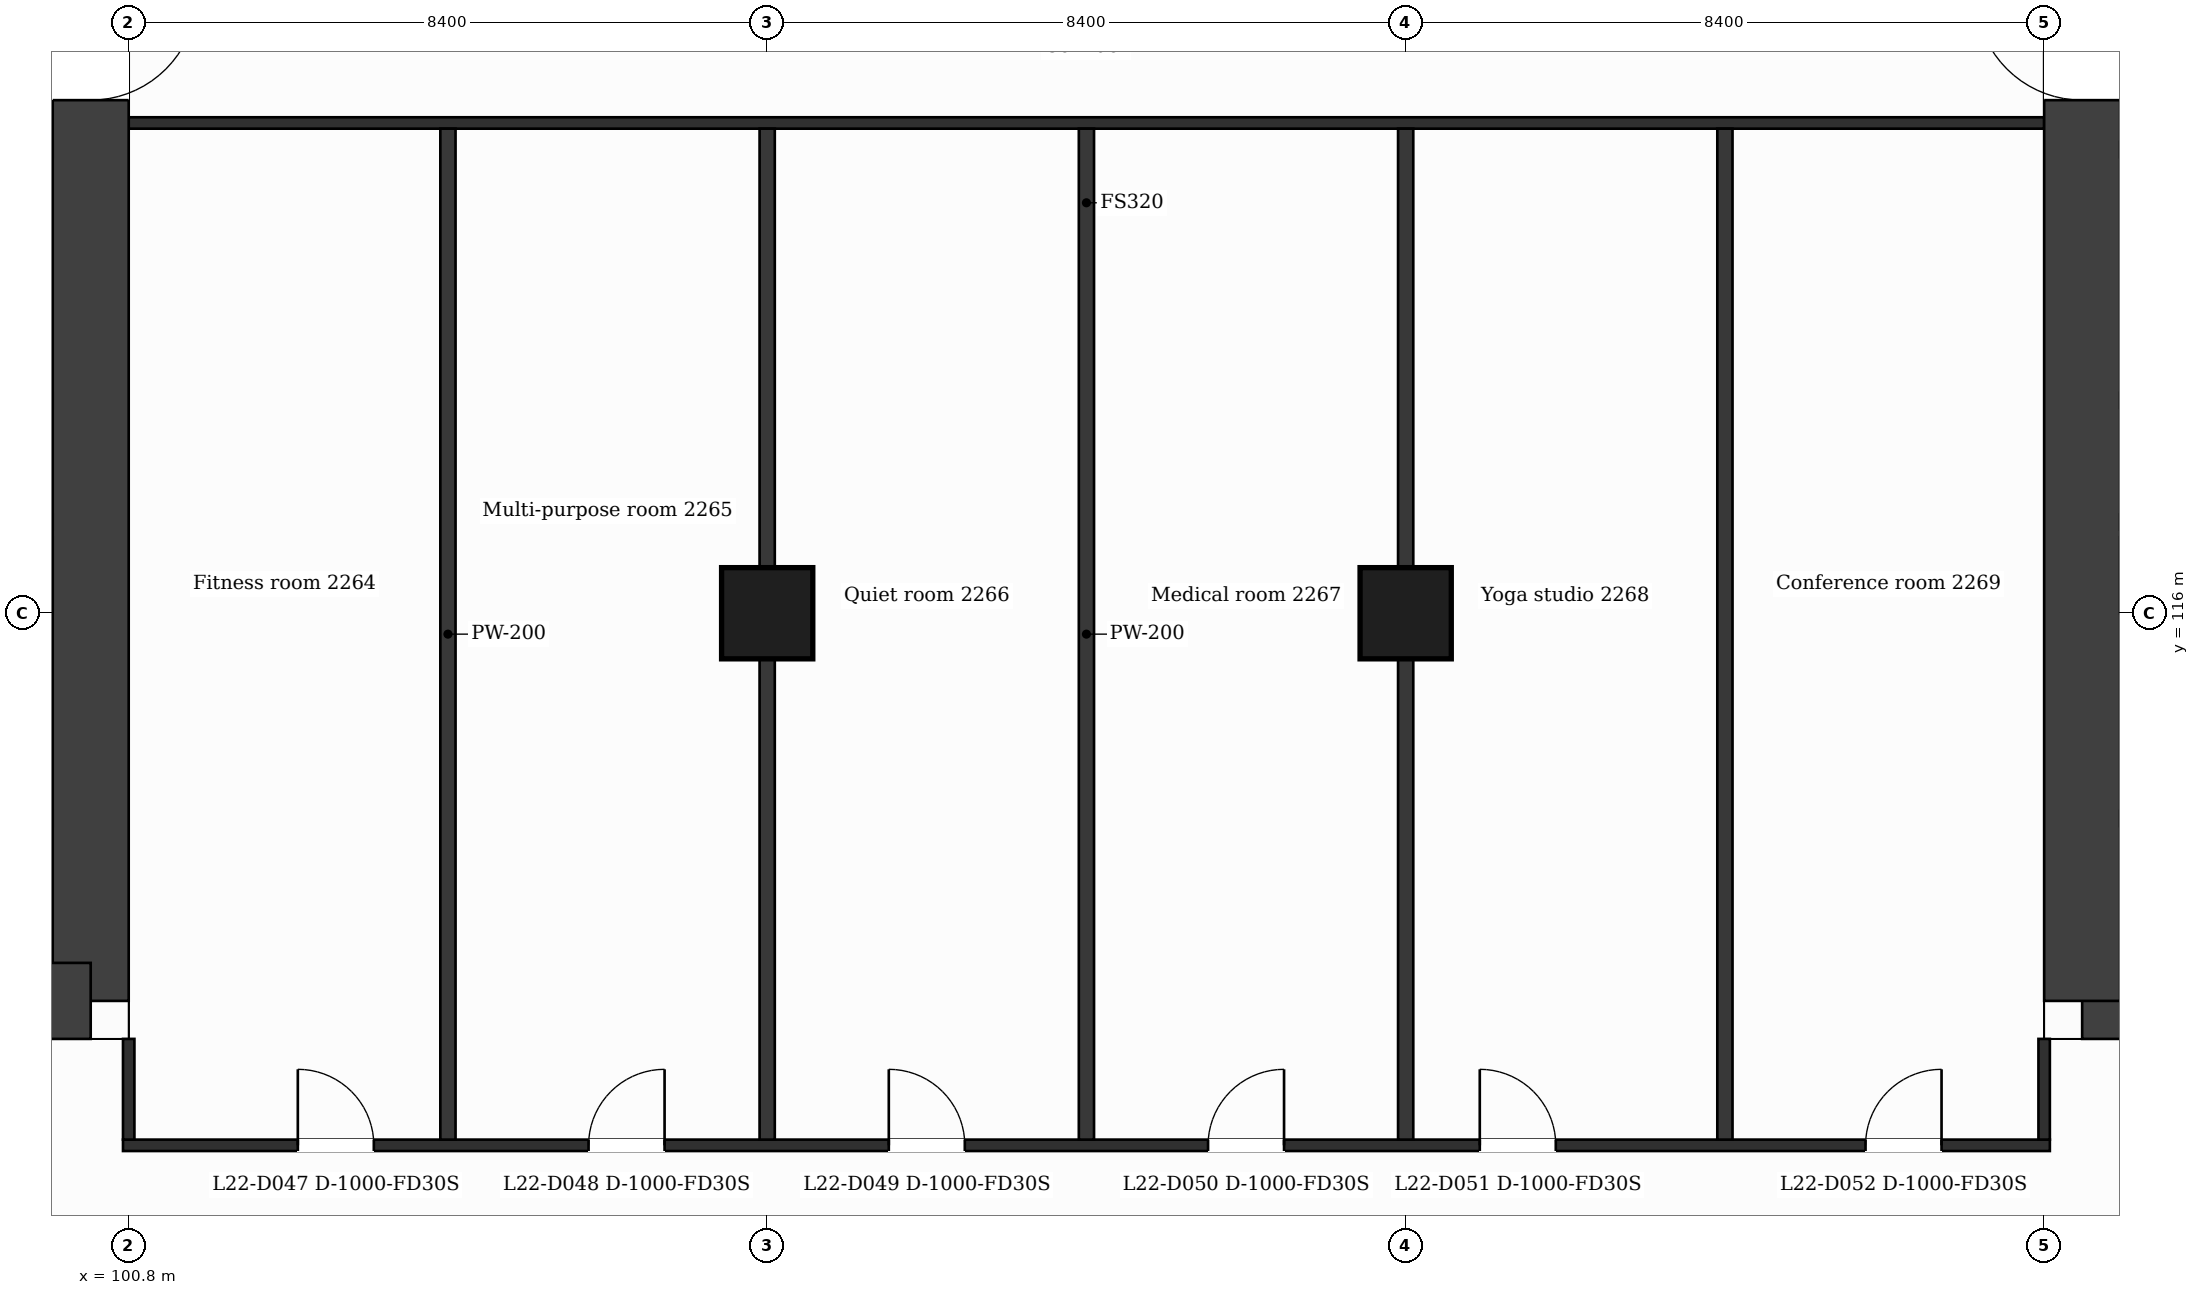
"""IFC4 building model, lengths in metres.
Left out: names, types, materials, properties, quantities, classifications, styles, units other than length and angle.
Written with IfcOpenShell. Run it as: python <this file> out.ifc"""

import sys

from ifc_helpers import new_model, si_unit, direction, frame, frame_2d, origin, origin_2d, place, context, subcontext, project, spatial, rectangle, extrude, element, fill, save


model = new_model("IFC4")
c1 = context("Model", 3, precision=1e-05, world=origin(), true_north=direction((0.0, 1.0)))
c2 = subcontext(c1, "Body", "Model", "MODEL_VIEW")
j1 = project(units=[si_unit("LENGTHUNIT", "METRE"), si_unit("PLANEANGLEUNIT", "RADIAN")], contexts=[c1])
p1 = place(None, origin())
s1 = spatial("IfcSite", under=j1, at=p1, CompositionType="ELEMENT")
p2 = place(p1, origin())
s2 = spatial("IfcBuilding", under=s1, at=p2, CompositionType="ELEMENT")
p3 = place(p2, frame((0.0, 0.0, 98.4)))
s3 = spatial("IfcBuildingStorey", under=s2, at=p3, CompositionType="ELEMENT", Elevation=98.4)
p4 = place(p3, frame((100.3, 131.9, 0.0), z_axis=(0.0, 0.0, 1.0), x_axis=(0.0, -1.0, 0.0)))
e1 = element("IfcWall", 1, at=p4, inside=s3, PredefinedType="SHEAR", context=c2, shape_type="SweptSolid", body=[
    extrude(rectangle(XDim=21.0, YDim=1.0, at=frame_2d((10.5, 0.0))), origin(), (0.0, 0.0, 1.0), 3.7),
])
p5 = place(p4, frame((7.75, 0.0, 0.0)))
e2 = element("IfcOpeningElement", 2, at=p5, cuts=e1, PredefinedType="OPENING", context=c2, shape_type="SweptSolid", body=[
    extrude(rectangle(XDim=1.4, YDim=2.1, at=frame_2d((0.7, 1.05))), frame((0.0, 0.51, 0.0), z_axis=(0.0, -1.0, 0.0), x_axis=(1.0, 0.0, 0.0)), (0.0, 0.0, 1.0), 1.02),
])
p6 = place(p3, frame((100.3, 110.9, 0.0), z_axis=(0.0, 0.0, 1.0), x_axis=(-1.0, 0.0, 0.0)))
e3 = element("IfcWall", 3, at=p6, inside=s3, PredefinedType="SHEAR", context=c2, shape_type="SweptSolid", body=[
    extrude(rectangle(XDim=14.059, YDim=1.0, at=frame_2d((7.03, 0.0))), origin(), (0.0, 0.0, 1.0), 3.7),
])
p7 = place(p6, frame((5.802, 0.0, 0.0)))
e4 = element("IfcOpeningElement", 4, at=p7, cuts=e3, PredefinedType="OPENING", context=c2, shape_type="SweptSolid", body=[
    extrude(rectangle(XDim=1.4, YDim=2.1, at=frame_2d((0.7, 1.05))), frame((0.0, 0.51, 0.0), z_axis=(0.0, -1.0, 0.0), x_axis=(1.0, 0.0, 0.0)), (0.0, 0.0, 1.0), 1.02),
])
p8 = place(p3, frame((94.9, 116.5, 0.0), z_axis=(0.0, 0.0, 1.0), x_axis=(1.0, 0.0, 0.0)))
e5 = element("IfcWall", 5, at=p8, inside=s3, PredefinedType="SHEAR", context=c2, shape_type="SweptSolid", body=[
    extrude(rectangle(XDim=4.9, YDim=1.0, at=frame_2d((2.45, 0.0))), origin(), (0.0, 0.0, 1.0), 3.7),
])
p9 = place(p3, frame((140.559, 110.9, 0.0), z_axis=(0.0, 0.0, 1.0), x_axis=(-1.0, 0.0, 0.0)))
e6 = element("IfcWall", 6, at=p9, inside=s3, PredefinedType="SHEAR", context=c2, shape_type="SweptSolid", body=[
    extrude(rectangle(XDim=14.059, YDim=1.0, at=frame_2d((7.029, 0.0))), origin(), (0.0, 0.0, 1.0), 3.7),
])
p10 = place(p9, frame((6.858, 0.0, 0.0)))
e7 = element("IfcOpeningElement", 7, at=p10, cuts=e6, PredefinedType="OPENING", context=c2, shape_type="SweptSolid", body=[
    extrude(rectangle(XDim=1.4, YDim=2.1, at=frame_2d((0.7, 1.05))), frame((0.0, 0.51, 0.0), z_axis=(0.0, -1.0, 0.0), x_axis=(1.0, 0.0, 0.0)), (0.0, 0.0, 1.0), 1.02),
])
p11 = place(p3, frame((126.5, 110.9, 0.0), z_axis=(0.0, 0.0, 1.0), x_axis=(0.0, 1.0, 0.0)))
e8 = element("IfcWall", 8, at=p11, inside=s3, PredefinedType="SHEAR", context=c2, shape_type="SweptSolid", body=[
    extrude(rectangle(XDim=21.0, YDim=1.0, at=frame_2d((10.5, 0.0))), origin(), (0.0, 0.0, 1.0), 3.7),
])
p12 = place(p11, frame((11.85, 0.0, 0.0)))
e9 = element("IfcOpeningElement", 9, at=p12, cuts=e8, PredefinedType="OPENING", context=c2, shape_type="SweptSolid", body=[
    extrude(rectangle(XDim=1.4, YDim=2.1, at=frame_2d((0.7, 1.05))), frame((0.0, 0.51, 0.0), z_axis=(0.0, -1.0, 0.0), x_axis=(1.0, 0.0, 0.0)), (0.0, 0.0, 1.0), 1.02),
])
for number, where, z_axis, x_axis in (
    (10, (109.2, 116.0, 0.0), (0.0, 0.0, 1.0), (1.0, 0.0, 0.0)),
    (11, (117.6, 116.0, 0.0), (0.0, 0.0, 1.0), (1.0, 0.0, 0.0)),
):
    element("IfcColumn", number, at=place(p3, frame(where, z_axis=z_axis, x_axis=x_axis)), inside=s3, PredefinedType="COLUMN", context=c2, shape_type="SweptSolid", body=[
        extrude(rectangle(XDim=1.2, YDim=1.2, at=origin_2d()), origin(), (0.0, 0.0, 1.0), 3.7),
    ])
p13 = place(p3, frame((100.725, 109.0, 0.0), z_axis=(0.0, 0.0, 1.0), x_axis=(1.0, 0.0, 0.0)))
e12 = element("IfcWall", 12, at=p13, inside=s3, PredefinedType="PARTITIONING", context=c2, shape_type="SweptSolid", body=[
    extrude(rectangle(XDim=25.35, YDim=0.15, at=frame_2d((12.675, 0.0))), origin(), (0.0, 0.0, 1.0), 3.38),
])
p14 = place(p13, frame((2.3, 0.0, 0.0)))
e13 = element("IfcOpeningElement", 13, at=p14, cuts=e12, PredefinedType="OPENING", context=c2, shape_type="SweptSolid", body=[
    extrude(rectangle(XDim=1.0, YDim=2.1, at=frame_2d((0.5, 1.05))), frame((0.0, 0.085, 0.0), z_axis=(0.0, -1.0, 0.0), x_axis=(1.0, 0.0, 0.0)), (0.0, 0.0, 1.0), 0.17),
])
p15 = place(p13, frame((6.125, 0.0, 0.0)))
e14 = element("IfcOpeningElement", 14, at=p15, cuts=e12, PredefinedType="OPENING", context=c2, shape_type="SweptSolid", body=[
    extrude(rectangle(XDim=1.0, YDim=2.1, at=frame_2d((0.5, 1.05))), frame((0.0, 0.085, 0.0), z_axis=(0.0, -1.0, 0.0), x_axis=(1.0, 0.0, 0.0)), (0.0, 0.0, 1.0), 0.17),
])
p16 = place(p13, frame((10.075, 0.0, 0.0)))
e15 = element("IfcOpeningElement", 15, at=p16, cuts=e12, PredefinedType="OPENING", context=c2, shape_type="SweptSolid", body=[
    extrude(rectangle(XDim=1.0, YDim=2.1, at=frame_2d((0.5, 1.05))), frame((0.0, 0.085, 0.0), z_axis=(0.0, -1.0, 0.0), x_axis=(1.0, 0.0, 0.0)), (0.0, 0.0, 1.0), 0.17),
])
p17 = place(p13, frame((14.275, 0.0, 0.0)))
e16 = element("IfcOpeningElement", 16, at=p17, cuts=e12, PredefinedType="OPENING", context=c2, shape_type="SweptSolid", body=[
    extrude(rectangle(XDim=1.0, YDim=2.1, at=frame_2d((0.5, 1.05))), frame((0.0, 0.085, 0.0), z_axis=(0.0, -1.0, 0.0), x_axis=(1.0, 0.0, 0.0)), (0.0, 0.0, 1.0), 0.17),
])
p18 = place(p13, frame((17.85, 0.0, 0.0)))
e17 = element("IfcOpeningElement", 17, at=p18, cuts=e12, PredefinedType="OPENING", context=c2, shape_type="SweptSolid", body=[
    extrude(rectangle(XDim=1.0, YDim=2.1, at=frame_2d((0.5, 1.05))), frame((0.0, 0.085, 0.0), z_axis=(0.0, -1.0, 0.0), x_axis=(1.0, 0.0, 0.0)), (0.0, 0.0, 1.0), 0.17),
])
p19 = place(p13, frame((22.925, 0.0, 0.0)))
e18 = element("IfcOpeningElement", 18, at=p19, cuts=e12, PredefinedType="OPENING", context=c2, shape_type="SweptSolid", body=[
    extrude(rectangle(XDim=1.0, YDim=2.1, at=frame_2d((0.5, 1.05))), frame((0.0, 0.085, 0.0), z_axis=(0.0, -1.0, 0.0), x_axis=(1.0, 0.0, 0.0)), (0.0, 0.0, 1.0), 0.17),
])
p20 = place(p3, frame((127.0, 113.3, 0.0), z_axis=(0.0, 0.0, 1.0), x_axis=(1.0, 0.0, 0.0)))
e19 = element("IfcWall", 19, at=p20, inside=s3, PredefinedType="PARTITIONING", context=c2, shape_type="SweptSolid", body=[
    extrude(rectangle(XDim=4.673, YDim=0.2, at=frame_2d((2.336, 0.0))), origin(), (0.0, 0.0, 1.0), 3.38),
])
p21 = place(p20, frame((0.472, 0.0, 0.0)))
e20 = element("IfcOpeningElement", 20, at=p21, cuts=e19, PredefinedType="OPENING", context=c2, shape_type="SweptSolid", body=[
    extrude(rectangle(XDim=1.1, YDim=2.1, at=frame_2d((0.55, 1.05))), frame((0.0, 0.11, 0.0), z_axis=(0.0, -1.0, 0.0), x_axis=(1.0, 0.0, 0.0)), (0.0, 0.0, 1.0), 0.22),
])
for number, where, z_axis, x_axis in (
    (21, (95.227, 117.2, 0.0), (0.0, 0.0, 1.0), (1.0, 0.0, 0.0)),
    (22, (95.227, 118.8, 0.0), (0.0, 0.0, 1.0), (1.0, 0.0, 0.0)),
):
    element("IfcWall", number, at=place(p3, frame(where, z_axis=z_axis, x_axis=x_axis)), inside=s3, PredefinedType="PARTITIONING", context=c2, shape_type="SweptSolid", body=[
        extrude(rectangle(XDim=4.573, YDim=0.2, at=frame_2d((2.287, 0.0))), origin(), (0.0, 0.0, 1.0), 3.38),
    ])
p22 = place(p3, frame((95.227, 122.1, 0.0), z_axis=(0.0, 0.0, 1.0), x_axis=(1.0, 0.0, 0.0)))
e23 = element("IfcWall", 23, at=p22, inside=s3, PredefinedType="PARTITIONING", context=c2, shape_type="SweptSolid", body=[
    extrude(rectangle(XDim=4.573, YDim=0.2, at=frame_2d((2.287, 0.0))), origin(), (0.0, 0.0, 1.0), 3.38),
])
p23 = place(p22, frame((0.693, 0.0, 0.0)))
e24 = element("IfcOpeningElement", 24, at=p23, cuts=e23, PredefinedType="OPENING", context=c2, shape_type="SweptSolid", body=[
    extrude(rectangle(XDim=0.9, YDim=2.1, at=frame_2d((0.45, 1.05))), frame((0.0, 0.11, 0.0), z_axis=(0.0, -1.0, 0.0), x_axis=(1.0, 0.0, 0.0)), (0.0, 0.0, 1.0), 0.22),
])
p24 = place(p22, frame((2.98, 0.0, 0.0)))
e25 = element("IfcOpeningElement", 25, at=p24, cuts=e23, PredefinedType="OPENING", context=c2, shape_type="SweptSolid", body=[
    extrude(rectangle(XDim=0.9, YDim=2.1, at=frame_2d((0.45, 1.05))), frame((0.0, 0.11, 0.0), z_axis=(0.0, -1.0, 0.0), x_axis=(1.0, 0.0, 0.0)), (0.0, 0.0, 1.0), 0.22),
])
p25 = place(p3, frame((100.8, 122.45, 0.0), z_axis=(0.0, 0.0, 1.0), x_axis=(1.0, 0.0, 0.0)))
e26 = element("IfcWall", 26, at=p25, inside=s3, PredefinedType="PARTITIONING", context=c2, shape_type="SweptSolid", body=[
    extrude(rectangle(XDim=25.2, YDim=0.15, at=frame_2d((12.6, 0.0))), origin(), (0.0, 0.0, 1.0), 3.38),
])
p26 = place(p3, frame((100.8, 109.075, 0.0), z_axis=(0.0, 0.0, 1.0), x_axis=(0.0, 1.0, 0.0)))
e27 = element("IfcWall", 27, at=p26, inside=s3, PredefinedType="PARTITIONING", context=c2, shape_type="SweptSolid", body=[
    extrude(rectangle(XDim=1.325, YDim=0.15, at=frame_2d((0.663, 0.0))), origin(), (0.0, 0.0, 1.0), 3.38),
])
for number, where, z_axis, x_axis in (
    (28, (105.0, 109.075, 0.0), (0.0, 0.0, 1.0), (0.0, 1.0, 0.0)),
    (29, (109.2, 109.075, 0.0), (0.0, 0.0, 1.0), (0.0, 1.0, 0.0)),
    (30, (113.4, 109.075, 0.0), (0.0, 0.0, 1.0), (0.0, 1.0, 0.0)),
    (31, (117.6, 109.075, 0.0), (0.0, 0.0, 1.0), (0.0, 1.0, 0.0)),
    (32, (121.8, 109.075, 0.0), (0.0, 0.0, 1.0), (0.0, 1.0, 0.0)),
):
    element("IfcWall", number, at=place(p3, frame(where, z_axis=z_axis, x_axis=x_axis)), inside=s3, PredefinedType="PARTITIONING", context=c2, shape_type="SweptSolid", body=[
        extrude(rectangle(XDim=13.3, YDim=0.2, at=frame_2d((6.65, 0.0))), origin(), (0.0, 0.0, 1.0), 3.38),
    ])
p27 = place(p3, frame((126.0, 109.075, 0.0), z_axis=(0.0, 0.0, 1.0), x_axis=(0.0, 1.0, 0.0)))
e33 = element("IfcWall", 33, at=p27, inside=s3, PredefinedType="PARTITIONING", context=c2, shape_type="SweptSolid", body=[
    extrude(rectangle(XDim=1.325, YDim=0.15, at=frame_2d((0.663, 0.0))), origin(), (0.0, 0.0, 1.0), 3.38),
])
p28 = place(p14, origin())
e34 = element("IfcDoor", 34, at=p28, inside=s3, OperationType="SINGLE_SWING_LEFT", PredefinedType="DOOR", context=c2, shape_type="SweptSolid", body=[
    extrude(rectangle(XDim=1.0, YDim=2.1, at=frame_2d((0.5, 1.05))), frame((0.0, 0.025, 0.0), z_axis=(0.0, -1.0, 0.0), x_axis=(1.0, 0.0, 0.0)), (0.0, 0.0, 1.0), 0.05),
])
fill(e13, e34)
p29 = place(p15, origin())
e35 = element("IfcDoor", 35, at=p29, inside=s3, OperationType="SINGLE_SWING_RIGHT", PredefinedType="DOOR", context=c2, shape_type="SweptSolid", body=[
    extrude(rectangle(XDim=1.0, YDim=2.1, at=frame_2d((0.5, 1.05))), frame((0.0, 0.025, 0.0), z_axis=(0.0, -1.0, 0.0), x_axis=(1.0, 0.0, 0.0)), (0.0, 0.0, 1.0), 0.05),
])
fill(e14, e35)
p30 = place(p16, origin())
e36 = element("IfcDoor", 36, at=p30, inside=s3, OperationType="SINGLE_SWING_LEFT", PredefinedType="DOOR", context=c2, shape_type="SweptSolid", body=[
    extrude(rectangle(XDim=1.0, YDim=2.1, at=frame_2d((0.5, 1.05))), frame((0.0, 0.025, 0.0), z_axis=(0.0, -1.0, 0.0), x_axis=(1.0, 0.0, 0.0)), (0.0, 0.0, 1.0), 0.05),
])
fill(e15, e36)
p31 = place(p17, origin())
e37 = element("IfcDoor", 37, at=p31, inside=s3, OperationType="SINGLE_SWING_RIGHT", PredefinedType="DOOR", context=c2, shape_type="SweptSolid", body=[
    extrude(rectangle(XDim=1.0, YDim=2.1, at=frame_2d((0.5, 1.05))), frame((0.0, 0.025, 0.0), z_axis=(0.0, -1.0, 0.0), x_axis=(1.0, 0.0, 0.0)), (0.0, 0.0, 1.0), 0.05),
])
fill(e16, e37)
p32 = place(p18, origin())
e38 = element("IfcDoor", 38, at=p32, inside=s3, OperationType="SINGLE_SWING_LEFT", PredefinedType="DOOR", context=c2, shape_type="SweptSolid", body=[
    extrude(rectangle(XDim=1.0, YDim=2.1, at=frame_2d((0.5, 1.05))), frame((0.0, 0.025, 0.0), z_axis=(0.0, -1.0, 0.0), x_axis=(1.0, 0.0, 0.0)), (0.0, 0.0, 1.0), 0.05),
])
fill(e17, e38)
p33 = place(p19, origin())
e39 = element("IfcDoor", 39, at=p33, inside=s3, OperationType="SINGLE_SWING_RIGHT", PredefinedType="DOOR", context=c2, shape_type="SweptSolid", body=[
    extrude(rectangle(XDim=1.0, YDim=2.1, at=frame_2d((0.5, 1.05))), frame((0.0, 0.025, 0.0), z_axis=(0.0, -1.0, 0.0), x_axis=(1.0, 0.0, 0.0)), (0.0, 0.0, 1.0), 0.05),
])
fill(e18, e39)
p34 = place(p5, origin())
e40 = element("IfcDoor", 40, at=p34, inside=s3, OperationType="SINGLE_SWING_LEFT", PredefinedType="DOOR", context=c2, shape_type="SweptSolid", body=[
    extrude(rectangle(XDim=1.4, YDim=2.1, at=frame_2d((0.7, 1.05))), frame((0.0, 0.025, 0.0), z_axis=(0.0, -1.0, 0.0), x_axis=(1.0, 0.0, 0.0)), (0.0, 0.0, 1.0), 0.05),
])
fill(e2, e40)
p35 = place(p12, origin())
e41 = element("IfcDoor", 41, at=p35, inside=s3, OperationType="SINGLE_SWING_RIGHT", PredefinedType="DOOR", context=c2, shape_type="SweptSolid", body=[
    extrude(rectangle(XDim=1.4, YDim=2.1, at=frame_2d((0.7, 1.05))), frame((0.0, 0.025, 0.0), z_axis=(0.0, -1.0, 0.0), x_axis=(1.0, 0.0, 0.0)), (0.0, 0.0, 1.0), 0.05),
])
fill(e9, e41)
save(model, sys.argv[1])
